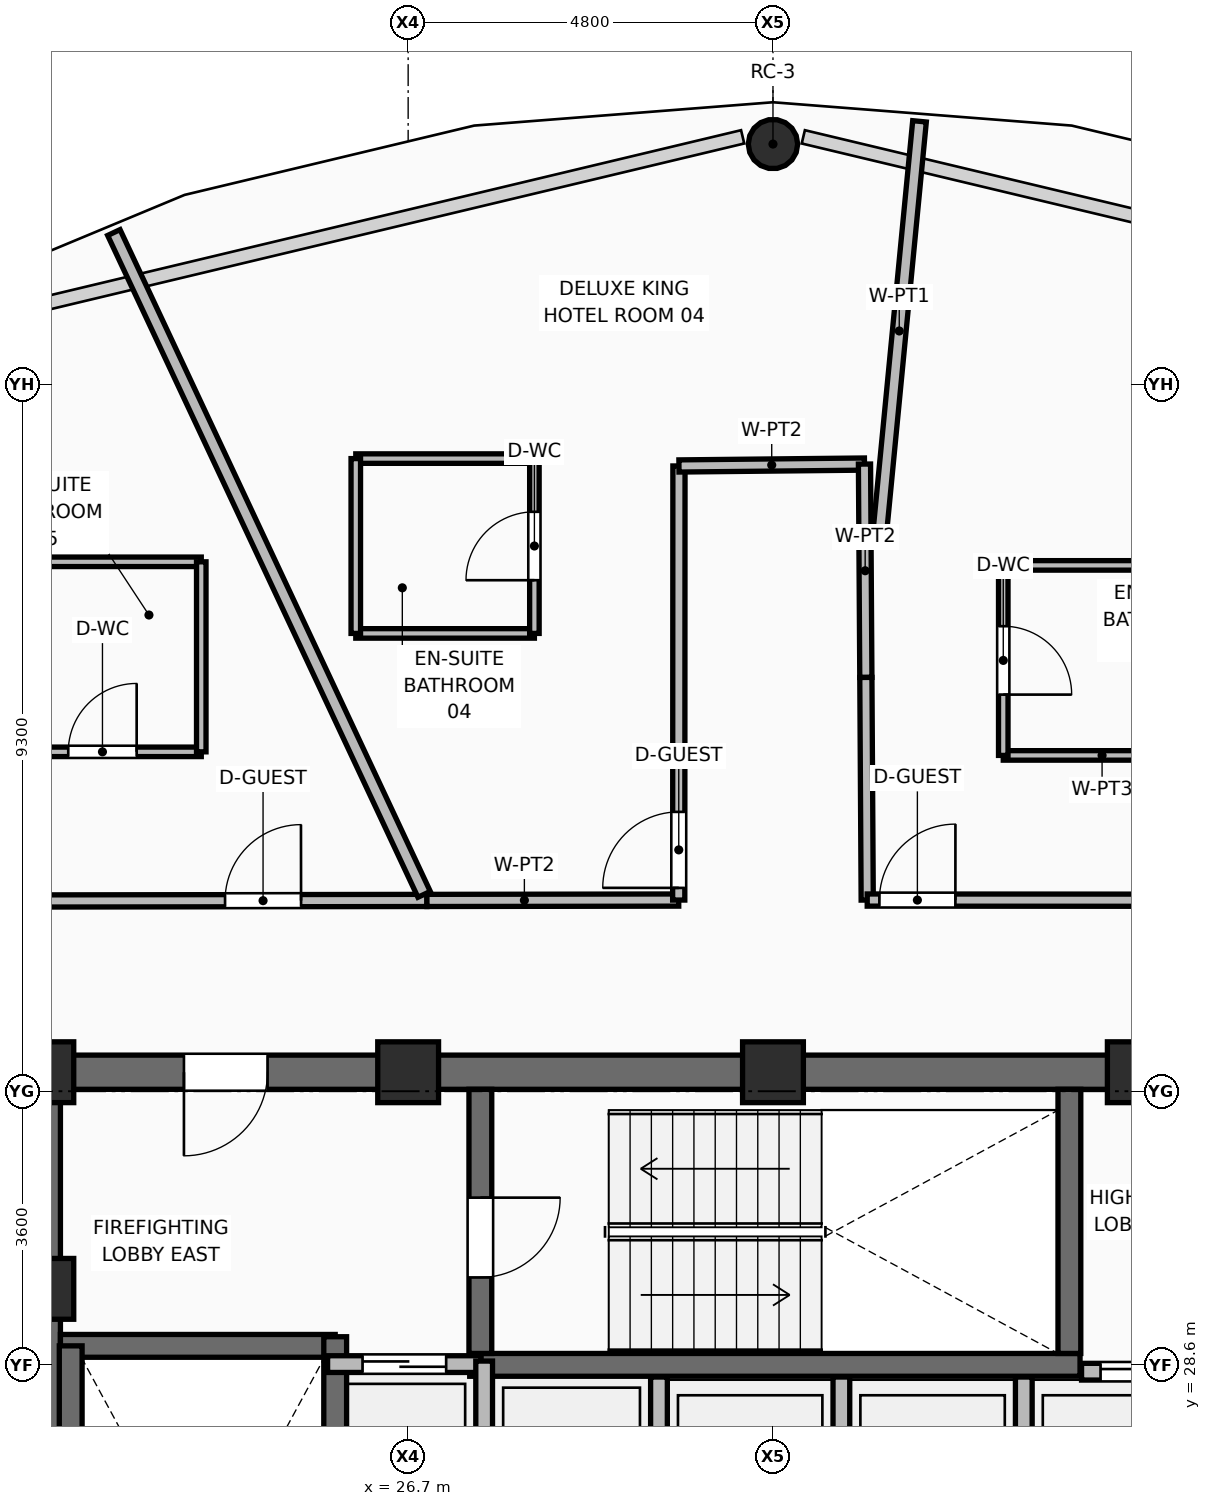
"""IFC4 building model, lengths in metres.
Left out: names, types, materials, properties, quantities, classifications, styles, units other than length and angle.
Written with IfcOpenShell. Run it as: python <this file> out.ifc"""

import sys

from ifc_helpers import new_model, si_unit, direction, frame, frame_2d, origin, origin_2d, place, context, subcontext, project, spatial, rectangle, hollow_circle, extrude, element, fill, save


model = new_model("IFC4")
c1 = context("Model", 3, precision=1e-05, world=origin(), true_north=direction((0.0, 1.0)))
c2 = subcontext(c1, "Body", "Model", "MODEL_VIEW")
j1 = project(units=[si_unit("LENGTHUNIT", "METRE"), si_unit("PLANEANGLEUNIT", "RADIAN")], contexts=[c1])
p1 = place(None, origin())
s1 = spatial("IfcSite", under=j1, at=p1, CompositionType="ELEMENT")
p2 = place(p1, origin())
s2 = spatial("IfcBuilding", under=s1, at=p2, CompositionType="ELEMENT")
p3 = place(p2, frame((0.0, 0.0, 216.15)))
s3 = spatial("IfcBuildingStorey", under=s2, at=p3, CompositionType="ELEMENT", Elevation=216.15)
for number, where, z_axis, x_axis in (
    (1, (21.9, 29.6, 0.0), (0.0, 0.0, 1.0), (1.0, 0.0, 0.0)),
    (2, (21.9, 32.45, 0.0), (0.0, 0.0, 1.0), (1.0, 0.0, 0.0)),
    (3, (26.7, 32.45, 0.0), (0.0, 0.0, 1.0), (1.0, 0.0, 0.0)),
    (4, (31.5, 32.45, 0.0), (0.0, 0.0, 1.0), (1.0, 0.0, 0.0)),
    (5, (36.3, 32.45, 0.0), (0.0, 0.0, 1.0), (1.0, 0.0, 0.0)),
):
    element("IfcColumn", number, at=place(p3, frame(where, z_axis=z_axis, x_axis=x_axis)), inside=s3, PredefinedType="COLUMN", context=c2, shape_type="SweptSolid", body=[
        extrude(rectangle(XDim=0.8, YDim=0.8, at=origin_2d()), origin(), (0.0, 0.0, 1.0), 3.75),
    ])
p4 = place(p3, frame((31.5, 44.661, 0.0), z_axis=(0.0, -0.01818751295, 0.999834593507), x_axis=(1.0, 0.0, 0.0)))
e6 = element("IfcColumn", 6, at=p4, inside=s3, PredefinedType="COLUMN", context=c2, shape_type="SweptSolid", body=[
    extrude(hollow_circle(Radius=0.325, WallThickness=0.03, at=origin_2d()), origin(), (0.0, 0.0, 1.0), 3.571),
])
p5 = place(p3, frame((30.0, 25.71, 0.0), z_axis=(0.0, 0.0, 1.0), x_axis=(0.0, 1.0, 0.0)))
e7 = element("IfcWall", 7, at=p5, inside=s3, PredefinedType="PARTITIONING", context=c2, shape_type="SweptSolid", body=[
    extrude(rectangle(XDim=2.73, YDim=0.22, at=frame_2d((1.365, 0.0))), origin(), (0.0, 0.0, 1.0), 3.545),
])
p6 = place(p3, frame((32.4, 26.2, 0.0), z_axis=(0.0, 0.0, 1.0), x_axis=(0.0, 1.0, 0.0)))
e8 = element("IfcWall", 8, at=p6, inside=s3, PredefinedType="PARTITIONING", context=c2, shape_type="SweptSolid", body=[
    extrude(rectangle(XDim=2.24, YDim=0.22, at=frame_2d((1.12, 0.0))), origin(), (0.0, 0.0, 1.0), 3.545),
])
p7 = place(p3, frame((34.8, 26.23, 0.0), z_axis=(0.0, 0.0, 1.0), x_axis=(0.0, 1.0, 0.0)))
e9 = element("IfcWall", 9, at=p7, inside=s3, PredefinedType="PARTITIONING", context=c2, shape_type="SweptSolid", body=[
    extrude(rectangle(XDim=2.21, YDim=0.22, at=frame_2d((1.105, 0.0))), origin(), (0.0, 0.0, 1.0), 3.545),
])
p8 = place(p3, frame((21.675, 32.45, 0.0), z_axis=(0.0, 0.0, 1.0), x_axis=(1.0, 0.0, 0.0)))
e10 = element("IfcWall", 10, at=p8, inside=s3, PredefinedType="SHEAR", context=c2, shape_type="SweptSolid", body=[
    extrude(rectangle(XDim=19.65, YDim=0.45, at=frame_2d((9.825, 0.0))), origin(), (0.0, 0.0, 1.0), 3.57),
])
p9 = place(p8, frame((2.075, 0.0, 0.0)))
e11 = element("IfcOpeningElement", 11, at=p9, cuts=e10, PredefinedType="OPENING", context=c2, shape_type="SweptSolid", body=[
    extrude(rectangle(XDim=1.1, YDim=2.1, at=frame_2d((0.55, 1.05))), frame((0.0, 0.235, 0.0), z_axis=(0.0, -1.0, 0.0), x_axis=(1.0, 0.0, 0.0)), (0.0, 0.0, 1.0), 0.47),
])
p10 = place(p8, frame((15.465, 0.0, 0.0)))
e12 = element("IfcOpeningElement", 12, at=p10, cuts=e10, PredefinedType="OPENING", context=c2, shape_type="SweptSolid", body=[
    extrude(rectangle(XDim=1.0, YDim=2.1, at=frame_2d((0.5, 1.05))), frame((0.0, 0.235, 0.0), z_axis=(0.0, -1.0, 0.0), x_axis=(1.0, 0.0, 0.0)), (0.0, 0.0, 1.0), 0.47),
])
p11 = place(p8, frame((17.475, 0.0, 0.0)))
e13 = element("IfcOpeningElement", 13, at=p11, cuts=e10, PredefinedType="OPENING", context=c2, shape_type="SweptSolid", body=[
    extrude(rectangle(XDim=0.9, YDim=2.1, at=frame_2d((0.45, 1.05))), frame((0.0, 0.235, 0.0), z_axis=(0.0, -1.0, 0.0), x_axis=(1.0, 0.0, 0.0)), (0.0, 0.0, 1.0), 0.47),
])
p12 = place(p3, frame((21.9, 18.025, 0.0), z_axis=(0.0, 0.0, 1.0), x_axis=(0.0, 1.0, 0.0)))
e14 = element("IfcWall", 14, at=p12, inside=s3, PredefinedType="SHEAR", context=c2, shape_type="SweptSolid", body=[
    extrude(rectangle(XDim=14.2, YDim=0.45, at=frame_2d((7.1, 0.0))), origin(), (0.0, 0.0, 1.0), 3.57),
])
p13 = place(p3, frame((22.125, 28.85, 0.0), z_axis=(0.0, 0.0, 1.0), x_axis=(1.0, 0.0, 0.0)))
e15 = element("IfcWall", 15, at=p13, inside=s3, PredefinedType="SHEAR", context=c2, shape_type="SweptSolid", body=[
    extrude(rectangle(XDim=3.615, YDim=0.3, at=frame_2d((1.808, 0.0))), origin(), (0.0, 0.0, 1.0), 3.57),
])
p14 = place(p3, frame((25.74, 20.98, 0.0), z_axis=(0.0, 0.0, 1.0), x_axis=(0.0, 1.0, 0.0)))
e16 = element("IfcWall", 16, at=p14, inside=s3, PredefinedType="SHEAR", context=c2, shape_type="SweptSolid", body=[
    extrude(rectangle(XDim=7.99, YDim=0.3, at=frame_2d((3.995, 0.0))), origin(), (0.0, 0.0, 1.0), 3.57),
])
p15 = place(p3, frame((22.26, 21.1, 0.0), z_axis=(0.0, 0.0, 1.0), x_axis=(0.0, 1.0, 0.0)))
e17 = element("IfcWall", 17, at=p15, inside=s3, PredefinedType="SHEAR", context=c2, shape_type="SweptSolid", body=[
    extrude(rectangle(XDim=7.75, YDim=0.3, at=frame_2d((3.875, 0.0))), origin(), (0.0, 0.0, 1.0), 3.57),
])
p16 = place(p3, frame((27.51, 28.6, 0.0), z_axis=(0.0, 0.0, 1.0), x_axis=(1.0, 0.0, 0.0)))
e18 = element("IfcWall", 18, at=p16, inside=s3, PredefinedType="SHEAR", context=c2, shape_type="SweptSolid", body=[
    extrude(rectangle(XDim=8.03, YDim=0.3, at=frame_2d((4.015, 0.0))), origin(), (0.0, 0.0, 1.0), 3.57),
])
p17 = place(p3, frame((27.65, 28.75, 0.0), z_axis=(0.0, 0.0, 1.0), x_axis=(0.0, 1.0, 0.0)))
e19 = element("IfcWall", 19, at=p17, inside=s3, PredefinedType="SHEAR", context=c2, shape_type="SweptSolid", body=[
    extrude(rectangle(XDim=3.475, YDim=0.3, at=frame_2d((1.738, 0.0))), origin(), (0.0, 0.0, 1.0), 3.57),
])
p18 = place(p17, frame((1.0, 0.0, 0.0)))
e20 = element("IfcOpeningElement", 20, at=p18, cuts=e19, PredefinedType="OPENING", context=c2, shape_type="SweptSolid", body=[
    extrude(rectangle(XDim=1.05, YDim=2.1, at=frame_2d((0.525, 1.05))), frame((0.0, 0.16, 0.0), z_axis=(0.0, -1.0, 0.0), x_axis=(1.0, 0.0, 0.0)), (0.0, 0.0, 1.0), 0.32),
])
p19 = place(p3, frame((35.4, 28.75, 0.0), z_axis=(0.0, 0.0, 1.0), x_axis=(0.0, 1.0, 0.0)))
e21 = element("IfcWall", 21, at=p19, inside=s3, PredefinedType="SHEAR", context=c2, shape_type="SweptSolid", body=[
    extrude(rectangle(XDim=3.475, YDim=0.3, at=frame_2d((1.738, 0.0))), origin(), (0.0, 0.0, 1.0), 3.57),
])
p20 = place(p3, frame((25.64, 28.61, 0.0), z_axis=(0.0, 0.0, 1.0), x_axis=(1.0, 0.0, 0.0)))
e22 = element("IfcWall", 22, at=p20, inside=s3, PredefinedType="PARTITIONING", context=c2, shape_type="SweptSolid", body=[
    extrude(rectangle(XDim=2.02, YDim=0.22, at=frame_2d((1.01, 0.0))), origin(), (0.0, 0.0, 1.0), 3.55),
])
p21 = place(p20, frame((0.46, 0.0, 0.0)))
e23 = element("IfcOpeningElement", 23, at=p21, cuts=e22, PredefinedType="OPENING", context=c2, shape_type="SweptSolid", body=[
    extrude(rectangle(XDim=1.1, YDim=2.2, at=frame_2d((0.55, 1.1))), frame((0.0, 0.12, 0.0), z_axis=(0.0, -1.0, 0.0), x_axis=(1.0, 0.0, 0.0)), (0.0, 0.0, 1.0), 0.24),
])
p22 = place(p3, frame((35.56, 28.51, 0.0), z_axis=(0.0, 0.0, 1.0), x_axis=(1.0, 0.0, 0.0)))
e24 = element("IfcWall", 24, at=p22, inside=s3, PredefinedType="PARTITIONING", context=c2, shape_type="SweptSolid", body=[
    extrude(rectangle(XDim=1.6, YDim=0.22, at=frame_2d((0.8, 0.0))), origin(), (0.0, 0.0, 1.0), 3.55),
])
p23 = place(p22, frame((0.25, 0.0, 0.0)))
e25 = element("IfcOpeningElement", 25, at=p23, cuts=e24, PredefinedType="OPENING", context=c2, shape_type="SweptSolid", body=[
    extrude(rectangle(XDim=1.1, YDim=2.2, at=frame_2d((0.55, 1.1))), frame((0.0, 0.12, 0.0), z_axis=(0.0, -1.0, 0.0), x_axis=(1.0, 0.0, 0.0)), (0.0, 0.0, 1.0), 0.24),
])
p24 = place(p3, frame((27.7, 25.65, 0.0), z_axis=(0.0, 0.0, 1.0), x_axis=(0.0, 1.0, 0.0)))
e26 = element("IfcWall", 26, at=p24, inside=s3, PredefinedType="PARTITIONING", context=c2, shape_type="SweptSolid", body=[
    extrude(rectangle(XDim=3.0, YDim=0.22, at=frame_2d((1.5, 0.0))), origin(), (0.0, 0.0, 1.0), 3.55),
])
p25 = place(p3, frame((19.644, 34.7, 0.0), z_axis=(0.0, 0.0, 1.0), x_axis=(0.999999060672, 0.00137064024, 0.0)))
e27 = element("IfcWall", 27, at=p25, inside=s3, PredefinedType="PARTITIONING", context=c2, shape_type="SweptSolid", body=[
    extrude(rectangle(XDim=7.303, YDim=0.16, at=frame_2d((3.651, 0.0))), origin(), (0.0, 0.0, 1.0), 3.081),
])
p26 = place(p25, frame((4.647, 0.0, 0.0)))
e28 = element("IfcOpeningElement", 28, at=p26, cuts=e27, PredefinedType="OPENING", context=c2, shape_type="SweptSolid", body=[
    extrude(rectangle(XDim=1.0, YDim=2.1, at=frame_2d((0.5, 1.05))), frame((0.0, 0.09, 0.0), z_axis=(0.0, -1.0, 0.0), x_axis=(1.0, 0.0, 0.0)), (0.0, 0.0, 1.0), 0.18),
])
p27 = place(p3, frame((26.947, 34.71, 0.0), z_axis=(0.0, 0.0, 1.0), x_axis=(0.999998802576, 0.001547529466, 0.0)))
e29 = element("IfcWall", 29, at=p27, inside=s3, PredefinedType="PARTITIONING", context=c2, shape_type="SweptSolid", body=[
    extrude(rectangle(XDim=3.313, YDim=0.16, at=frame_2d((1.656, 0.0))), origin(), (0.0, 0.0, 1.0), 3.55),
])
p28 = place(p3, frame((30.26, 34.715, 0.0), z_axis=(0.0, 0.0, 1.0), x_axis=(0.000512995829, 0.999999868418, 0.0)))
e30 = element("IfcWall", 30, at=p28, inside=s3, PredefinedType="PARTITIONING", context=c2, shape_type="SweptSolid", body=[
    extrude(rectangle(XDim=5.711, YDim=0.16, at=frame_2d((2.855, 0.0))), origin(), (0.0, 0.0, 1.0), 3.55),
])
p29 = place(p28, frame((0.16, 0.0, 0.0)))
e31 = element("IfcOpeningElement", 31, at=p29, cuts=e30, PredefinedType="OPENING", context=c2, shape_type="SweptSolid", body=[
    extrude(rectangle(XDim=1.0, YDim=2.1, at=frame_2d((0.5, 1.05))), frame((0.0, 0.09, 0.0), z_axis=(0.0, -1.0, 0.0), x_axis=(1.0, 0.0, 0.0)), (0.0, 0.0, 1.0), 0.18),
])
p30 = place(p3, frame((30.263, 40.426, 0.0), z_axis=(0.0, 0.0, 1.0), x_axis=(0.999947973655, 0.01020048938, 0.0)))
e32 = element("IfcWall", 32, at=p30, inside=s3, PredefinedType="PARTITIONING", context=c2, shape_type="SweptSolid", body=[
    extrude(rectangle(XDim=2.441, YDim=0.16, at=frame_2d((1.221, 0.0))), origin(), (0.0, 0.0, 1.0), 3.081),
])
p31 = place(p3, frame((32.704, 40.451, 0.0), z_axis=(0.0, 0.0, 1.0), x_axis=(0.006349354485, -0.999979842646, 0.0)))
e33 = element("IfcWall", 33, at=p31, inside=s3, PredefinedType="PARTITIONING", context=c2, shape_type="SweptSolid", body=[
    extrude(rectangle(XDim=2.807, YDim=0.16, at=frame_2d((1.403, 0.0))), origin(), (0.0, 0.0, 1.0), 3.55),
])
p32 = place(p3, frame((32.722, 37.644, 0.0), z_axis=(0.0, 0.0, 1.0), x_axis=(0.006168091382, -0.999980977143, 0.0)))
e34 = element("IfcWall", 34, at=p32, inside=s3, PredefinedType="PARTITIONING", context=c2, shape_type="SweptSolid", body=[
    extrude(rectangle(XDim=2.929, YDim=0.16, at=frame_2d((1.464, 0.0))), origin(), (0.0, 0.0, 1.0), 3.55),
])
p33 = place(p3, frame((32.74, 34.715, 0.0), z_axis=(0.0, 0.0, 1.0), x_axis=(0.999999831231, -0.000580979523, 0.0)))
e35 = element("IfcWall", 35, at=p33, inside=s3, PredefinedType="PARTITIONING", context=c2, shape_type="SweptSolid", body=[
    extrude(rectangle(XDim=5.463, YDim=0.16, at=frame_2d((2.731, 0.0))), origin(), (0.0, 0.0, 1.0), 3.55),
])
p34 = place(p33, frame((0.16, 0.0, 0.0)))
e36 = element("IfcOpeningElement", 36, at=p34, cuts=e35, PredefinedType="OPENING", context=c2, shape_type="SweptSolid", body=[
    extrude(rectangle(XDim=1.0, YDim=2.1, at=frame_2d((0.5, 1.05))), frame((0.0, 0.09, 0.0), z_axis=(0.0, -1.0, 0.0), x_axis=(1.0, 0.0, 0.0)), (0.0, 0.0, 1.0), 0.18),
])
p35 = place(p3, frame((32.895, 39.444, 0.0), z_axis=(0.0, 0.0, 1.0), x_axis=(0.096174947315, 0.995364445572, 0.0)))
e37 = element("IfcWall", 37, at=p35, inside=s3, PredefinedType="PARTITIONING", context=c2, shape_type="SweptSolid", body=[
    extrude(rectangle(XDim=5.542, YDim=0.18, at=frame_2d((2.771, 0.0))), origin(), (0.0, 0.0, 1.0), 2.925),
])
p36 = place(p3, frame((26.91, 34.79, 0.0), z_axis=(0.0, 0.0, 1.0), x_axis=(-0.424485911605, 0.905434542553, 0.0)))
e38 = element("IfcWall", 38, at=p36, inside=s3, PredefinedType="PARTITIONING", context=c2, shape_type="SweptSolid", body=[
    extrude(rectangle(XDim=9.616, YDim=0.18, at=frame_2d((4.808, 0.0))), origin(), (0.0, 0.0, 1.0), 2.925),
])
for number, where, z_axis, x_axis in (
    (39, (34.53, 36.618, 0.0), (0.0, 0.0, 1.0), (1.0, 0.0, 0.0)),
    (40, (34.53, 39.118, 0.0), (0.0, 0.0, 1.0), (1.0, 0.0, 0.0)),
):
    element("IfcWall", number, at=place(p3, frame(where, z_axis=z_axis, x_axis=x_axis)), inside=s3, PredefinedType="PARTITIONING", context=c2, shape_type="SweptSolid", body=[
        extrude(rectangle(XDim=2.6, YDim=0.125, at=frame_2d((1.3, 0.0))), origin(), (0.0, 0.0, 1.0), 3.55),
    ])
p37 = place(p3, frame((34.53, 36.618, 0.0), z_axis=(0.0, 0.0, 1.0), x_axis=(0.0, 1.0, 0.0)))
e41 = element("IfcWall", 41, at=p37, inside=s3, PredefinedType="PARTITIONING", context=c2, shape_type="SweptSolid", body=[
    extrude(rectangle(XDim=2.5, YDim=0.125, at=frame_2d((1.25, 0.0))), origin(), (0.0, 0.0, 1.0), 3.55),
])
p38 = place(p37, frame((0.8, 0.0, 0.0)))
e42 = element("IfcOpeningElement", 42, at=p38, cuts=e41, PredefinedType="OPENING", context=c2, shape_type="SweptSolid", body=[
    extrude(rectangle(XDim=0.9, YDim=2.1, at=frame_2d((0.45, 1.05))), frame((0.0, 0.073, 0.0), z_axis=(0.0, -1.0, 0.0), x_axis=(1.0, 0.0, 0.0)), (0.0, 0.0, 1.0), 0.145),
])
for number, where, z_axis, x_axis in (
    (43, (26.011, 38.223, 0.0), (0.0, 0.0, 1.0), (1.0, 0.0, 0.0)),
    (44, (26.011, 40.523, 0.0), (0.0, 0.0, 1.0), (1.0, 0.0, 0.0)),
):
    element("IfcWall", number, at=place(p3, frame(where, z_axis=z_axis, x_axis=x_axis)), inside=s3, PredefinedType="PARTITIONING", context=c2, shape_type="SweptSolid", body=[
        extrude(rectangle(XDim=2.35, YDim=0.125, at=frame_2d((1.175, 0.0))), origin(), (0.0, 0.0, 1.0), 3.55),
    ])
p39 = place(p3, frame((26.011, 38.223, 0.0), z_axis=(0.0, 0.0, 1.0), x_axis=(0.0, 1.0, 0.0)))
e45 = element("IfcWall", 45, at=p39, inside=s3, PredefinedType="PARTITIONING", context=c2, shape_type="SweptSolid", body=[
    extrude(rectangle(XDim=2.3, YDim=0.125, at=frame_2d((1.15, 0.0))), origin(), (0.0, 0.0, 1.0), 3.55),
])
p40 = place(p3, frame((28.361, 38.223, 0.0), z_axis=(0.0, 0.0, 1.0), x_axis=(0.0, 1.0, 0.0)))
e46 = element("IfcWall", 46, at=p40, inside=s3, PredefinedType="PARTITIONING", context=c2, shape_type="SweptSolid", body=[
    extrude(rectangle(XDim=2.3, YDim=0.125, at=frame_2d((1.15, 0.0))), origin(), (0.0, 0.0, 1.0), 3.55),
])
p41 = place(p40, frame((0.7, 0.0, 0.0)))
e47 = element("IfcOpeningElement", 47, at=p41, cuts=e46, PredefinedType="OPENING", context=c2, shape_type="SweptSolid", body=[
    extrude(rectangle(XDim=0.9, YDim=2.1, at=frame_2d((0.45, 1.05))), frame((0.0, 0.073, 0.0), z_axis=(0.0, -1.0, 0.0), x_axis=(1.0, 0.0, 0.0)), (0.0, 0.0, 1.0), 0.145),
])
p42 = place(p3, frame((21.378, 36.665, 0.0), z_axis=(0.0, 0.0, 1.0), x_axis=(1.0, 0.0, 0.0)))
e48 = element("IfcWall", 48, at=p42, inside=s3, PredefinedType="PARTITIONING", context=c2, shape_type="SweptSolid", body=[
    extrude(rectangle(XDim=2.6, YDim=0.125, at=frame_2d((1.3, 0.0))), origin(), (0.0, 0.0, 1.0), 3.081),
])
p43 = place(p42, frame((0.85, 0.0, 0.0)))
e49 = element("IfcOpeningElement", 49, at=p43, cuts=e48, PredefinedType="OPENING", context=c2, shape_type="SweptSolid", body=[
    extrude(rectangle(XDim=0.9, YDim=2.1, at=frame_2d((0.45, 1.05))), frame((0.0, 0.073, 0.0), z_axis=(0.0, -1.0, 0.0), x_axis=(1.0, 0.0, 0.0)), (0.0, 0.0, 1.0), 0.145),
])
p44 = place(p3, frame((21.378, 39.165, 0.0), z_axis=(0.0, 0.0, 1.0), x_axis=(1.0, 0.0, 0.0)))
e50 = element("IfcWall", 50, at=p44, inside=s3, PredefinedType="PARTITIONING", context=c2, shape_type="SweptSolid", body=[
    extrude(rectangle(XDim=2.6, YDim=0.125, at=frame_2d((1.3, 0.0))), origin(), (0.0, 0.0, 1.0), 3.55),
])
p45 = place(p3, frame((23.978, 36.665, 0.0), z_axis=(0.0, 0.0, 1.0), x_axis=(0.0, 1.0, 0.0)))
e51 = element("IfcWall", 51, at=p45, inside=s3, PredefinedType="PARTITIONING", context=c2, shape_type="SweptSolid", body=[
    extrude(rectangle(XDim=2.5, YDim=0.125, at=frame_2d((1.25, 0.0))), origin(), (0.0, 0.0, 1.0), 3.55),
])
p46 = place(p18, frame((1.05, 0.0, 0.0), z_axis=(0.0, 0.0, 1.0), x_axis=(-1.0, 0.0, 0.0)))
e52 = element("IfcDoor", 52, at=p46, inside=s3, OperationType="SINGLE_SWING_LEFT", PredefinedType="DOOR", context=c2, shape_type="SweptSolid", body=[
    extrude(rectangle(XDim=1.05, YDim=2.1, at=frame_2d((0.525, 1.05))), frame((0.0, 0.025, 0.0), z_axis=(0.0, -1.0, 0.0), x_axis=(1.0, 0.0, 0.0)), (0.0, 0.0, 1.0), 0.05),
])
fill(e20, e52)
p47 = place(p21, origin())
e53 = element("IfcDoor", 53, at=p47, inside=s3, OperationType="DOUBLE_DOOR_SLIDING", PredefinedType="DOOR", context=c2, shape_type="SweptSolid", body=[
    extrude(rectangle(XDim=1.1, YDim=2.2, at=frame_2d((0.55, 1.1))), frame((0.0, 0.025, 0.0), z_axis=(0.0, -1.0, 0.0), x_axis=(1.0, 0.0, 0.0)), (0.0, 0.0, 1.0), 0.05),
])
fill(e23, e53)
p48 = place(p23, origin())
e54 = element("IfcDoor", 54, at=p48, inside=s3, OperationType="DOUBLE_DOOR_SLIDING", PredefinedType="DOOR", context=c2, shape_type="SweptSolid", body=[
    extrude(rectangle(XDim=1.1, YDim=2.2, at=frame_2d((0.55, 1.1))), frame((0.0, 0.025, 0.0), z_axis=(0.0, -1.0, 0.0), x_axis=(1.0, 0.0, 0.0)), (0.0, 0.0, 1.0), 0.05),
])
fill(e25, e54)
p49 = place(p9, frame((1.1, 0.0, 0.0), z_axis=(0.0, 0.0, 1.0), x_axis=(-1.0, 0.0, 0.0)))
e55 = element("IfcDoor", 55, at=p49, inside=s3, OperationType="SINGLE_SWING_RIGHT", PredefinedType="DOOR", context=c2, shape_type="SweptSolid", body=[
    extrude(rectangle(XDim=1.1, YDim=2.1, at=frame_2d((0.55, 1.05))), frame((0.0, 0.025, 0.0), z_axis=(0.0, -1.0, 0.0), x_axis=(1.0, 0.0, 0.0)), (0.0, 0.0, 1.0), 0.05),
])
fill(e11, e55)
p50 = place(p38, frame((0.9, 0.0, 0.0), z_axis=(0.0, 0.0, 1.0), x_axis=(-1.0, 0.0, 0.0)))
e56 = element("IfcDoor", 56, at=p50, inside=s3, OperationType="SINGLE_SWING_RIGHT", PredefinedType="DOOR", context=c2, shape_type="SweptSolid", body=[
    extrude(rectangle(XDim=0.9, YDim=2.1, at=frame_2d((0.45, 1.05))), frame((0.0, 0.025, 0.0), z_axis=(0.0, -1.0, 0.0), x_axis=(1.0, 0.0, 0.0)), (0.0, 0.0, 1.0), 0.05),
])
fill(e42, e56)
p51 = place(p34, origin())
e57 = element("IfcDoor", 57, at=p51, inside=s3, OperationType="SINGLE_SWING_RIGHT", PredefinedType="DOOR", context=c2, shape_type="SweptSolid", body=[
    extrude(rectangle(XDim=1.0, YDim=2.1, at=frame_2d((0.5, 1.05))), frame((0.0, 0.025, 0.0), z_axis=(0.0, -1.0, 0.0), x_axis=(1.0, 0.0, 0.0)), (0.0, 0.0, 1.0), 0.05),
])
fill(e36, e57)
p52 = place(p41, origin())
e58 = element("IfcDoor", 58, at=p52, inside=s3, OperationType="SINGLE_SWING_LEFT", PredefinedType="DOOR", context=c2, shape_type="SweptSolid", body=[
    extrude(rectangle(XDim=0.9, YDim=2.1, at=frame_2d((0.45, 1.05))), frame((0.0, 0.025, 0.0), z_axis=(0.0, -1.0, 0.0), x_axis=(1.0, 0.0, 0.0)), (0.0, 0.0, 1.0), 0.05),
])
fill(e47, e58)
p53 = place(p29, origin())
e59 = element("IfcDoor", 59, at=p53, inside=s3, OperationType="SINGLE_SWING_LEFT", PredefinedType="DOOR", context=c2, shape_type="SweptSolid", body=[
    extrude(rectangle(XDim=1.0, YDim=2.1, at=frame_2d((0.5, 1.05))), frame((0.0, 0.025, 0.0), z_axis=(0.0, -1.0, 0.0), x_axis=(1.0, 0.0, 0.0)), (0.0, 0.0, 1.0), 0.05),
])
fill(e31, e59)
p54 = place(p43, origin())
e60 = element("IfcDoor", 60, at=p54, inside=s3, OperationType="SINGLE_SWING_RIGHT", PredefinedType="DOOR", context=c2, shape_type="SweptSolid", body=[
    extrude(rectangle(XDim=0.9, YDim=2.1, at=frame_2d((0.45, 1.05))), frame((0.0, 0.025, 0.0), z_axis=(0.0, -1.0, 0.0), x_axis=(1.0, 0.0, 0.0)), (0.0, 0.0, 1.0), 0.05),
])
fill(e49, e60)
p55 = place(p26, origin())
e61 = element("IfcDoor", 61, at=p55, inside=s3, OperationType="SINGLE_SWING_RIGHT", PredefinedType="DOOR", context=c2, shape_type="SweptSolid", body=[
    extrude(rectangle(XDim=1.0, YDim=2.1, at=frame_2d((0.5, 1.05))), frame((0.0, 0.025, 0.0), z_axis=(0.0, -1.0, 0.0), x_axis=(1.0, 0.0, 0.0)), (0.0, 0.0, 1.0), 0.05),
])
fill(e28, e61)
save(model, sys.argv[1])
